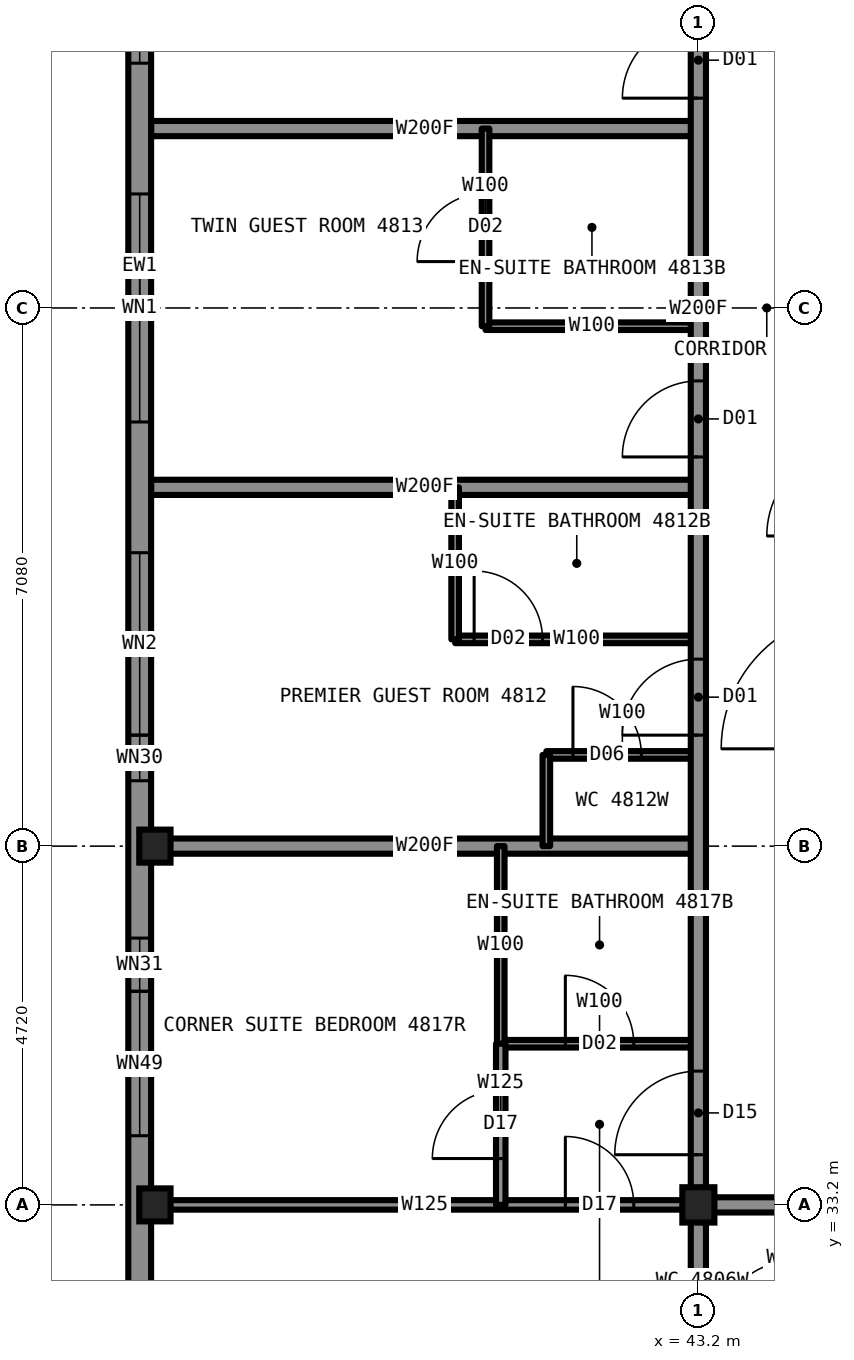
"""IFC4 building model, lengths in metres.
Left out: names, types, materials, properties, quantities, classifications, styles, units other than length and angle.
Written with IfcOpenShell. Run it as: python <this file> out.ifc"""

import sys

from ifc_helpers import new_model, si_unit, direction, frame, frame_2d, origin, origin_2d, place, context, subcontext, project, spatial, rectangle, i_section, extrude, element, fill, save


model = new_model("IFC4")
c1 = context("Model", 3, precision=1e-05, world=origin(), true_north=direction((0.0, 1.0)))
c2 = subcontext(c1, "Body", "Model", "MODEL_VIEW")
j1 = project(units=[si_unit("LENGTHUNIT", "METRE"), si_unit("PLANEANGLEUNIT", "RADIAN")], contexts=[c1])
p1 = place(None, origin())
s1 = spatial("IfcSite", under=j1, at=p1, CompositionType="ELEMENT")
p2 = place(p1, origin())
s2 = spatial("IfcBuilding", under=s1, at=p2, CompositionType="ELEMENT")
p3 = place(p2, frame((0.0, 0.0, 172.3)))
s3 = spatial("IfcBuildingStorey", under=s2, at=p3, CompositionType="ELEMENT", Elevation=172.3)
for number, where, z_axis, x_axis in (
    (1, (36.05, 33.2, 0.0), (0.0, 0.0, 1.0), (1.0, 0.0, 0.0)),
    (2, (36.05, 37.92, 0.0), (0.0, 0.0, 1.0), (1.0, 0.0, 0.0)),
):
    element("IfcColumn", number, at=place(p3, frame(where, z_axis=z_axis, x_axis=x_axis)), inside=s3, PredefinedType="COLUMN", context=c2, shape_type="SweptSolid", body=[
        extrude(i_section(OverallWidth=0.411, OverallDepth=0.434, WebThickness=0.036, FlangeThickness=0.057, at=origin_2d()), origin(), (0.0, 0.0, 1.0), 3.5),
    ])
p4 = place(p3, frame((43.2, 33.2, 0.0), z_axis=(0.0, 0.0, 1.0), x_axis=(1.0, 0.0, 0.0)))
e3 = element("IfcColumn", 3, at=p4, inside=s3, PredefinedType="COLUMN", context=c2, shape_type="SweptSolid", body=[
    extrude(i_section(OverallWidth=0.422, OverallDepth=0.465, WebThickness=0.045, FlangeThickness=0.073, at=origin_2d()), origin(), (0.0, 0.0, 1.0), 3.5),
])
p5 = place(p3, frame((40.4, 44.76, 0.0), z_axis=(0.0, 0.0, 1.0), x_axis=(1.0, 0.0, 0.0)))
e4 = element("IfcWall", 4, at=p5, inside=s3, PredefinedType="PARTITIONING", context=c2, shape_type="SweptSolid", body=[
    extrude(rectangle(XDim=2.8, YDim=0.1, at=frame_2d((1.4, 0.0))), origin(), (0.0, 0.0, 1.0), 3.33),
])
p6 = place(p3, frame((43.2, 33.2, 0.0), z_axis=(0.0, 0.0, 1.0), x_axis=(1.0, 0.0, 0.0)))
e5 = element("IfcWall", 5, at=p6, inside=s3, PredefinedType="PARTITIONING", context=c2, shape_type="SweptSolid", body=[
    extrude(rectangle(XDim=23.6, YDim=0.2, at=frame_2d((11.8, 0.0))), origin(), (0.0, 0.0, 1.0), 3.33),
])
p7 = place(p6, frame((1.46, 0.0, 0.0)))
e6 = element("IfcOpeningElement", 6, at=p7, cuts=e5, PredefinedType="OPENING", context=c2, shape_type="SweptSolid", body=[
    extrude(rectangle(XDim=1.0, YDim=2.2, at=frame_2d((0.5, 1.1))), frame((0.0, 0.11, 0.0), z_axis=(0.0, -1.0, 0.0), x_axis=(1.0, 0.0, 0.0)), (0.0, 0.0, 1.0), 0.22),
])
p8 = place(p6, frame((7.72, 0.0, 0.0)))
e7 = element("IfcOpeningElement", 7, at=p8, cuts=e5, PredefinedType="OPENING", context=c2, shape_type="SweptSolid", body=[
    extrude(rectangle(XDim=1.0, YDim=2.2, at=frame_2d((0.5, 1.1))), frame((0.0, 0.11, 0.0), z_axis=(0.0, -1.0, 0.0), x_axis=(1.0, 0.0, 0.0)), (0.0, 0.0, 1.0), 0.22),
])
p9 = place(p6, frame((17.16, 0.0, 0.0)))
e8 = element("IfcOpeningElement", 8, at=p9, cuts=e5, PredefinedType="OPENING", context=c2, shape_type="SweptSolid", body=[
    extrude(rectangle(XDim=1.0, YDim=2.2, at=frame_2d((0.5, 1.1))), frame((0.0, 0.11, 0.0), z_axis=(0.0, -1.0, 0.0), x_axis=(1.0, 0.0, 0.0)), (0.0, 0.0, 1.0), 0.22),
])
p10 = place(p3, frame((36.0, 33.2, 0.0), z_axis=(0.0, 0.0, 1.0), x_axis=(1.0, 0.0, 0.0)))
e9 = element("IfcWall", 9, at=p10, inside=s3, PredefinedType="PARTITIONING", context=c2, shape_type="SweptSolid", body=[
    extrude(rectangle(XDim=7.2, YDim=0.125, at=frame_2d((3.6, 0.0))), origin(), (0.0, 0.0, 1.0), 2.573),
])
p11 = place(p10, frame((5.45, 0.0, 0.0)))
e10 = element("IfcOpeningElement", 10, at=p11, cuts=e9, PredefinedType="OPENING", context=c2, shape_type="SweptSolid", body=[
    extrude(rectangle(XDim=0.9, YDim=2.2, at=frame_2d((0.45, 1.1))), frame((0.0, 0.073, 0.0), z_axis=(0.0, -1.0, 0.0), x_axis=(1.0, 0.0, 0.0)), (0.0, 0.0, 1.0), 0.145),
])
p12 = place(p3, frame((36.0, 42.64, 0.0), z_axis=(0.0, 0.0, 1.0), x_axis=(1.0, 0.0, 0.0)))
e11 = element("IfcWall", 11, at=p12, inside=s3, PredefinedType="PARTITIONING", context=c2, shape_type="SweptSolid", body=[
    extrude(rectangle(XDim=7.2, YDim=0.2, at=frame_2d((3.6, 0.0))), origin(), (0.0, 0.0, 1.0), 2.73),
])
p13 = place(p3, frame((40.0, 40.64, 0.0), z_axis=(0.0, 0.0, 1.0), x_axis=(1.0, 0.0, 0.0)))
e12 = element("IfcWall", 12, at=p13, inside=s3, PredefinedType="PARTITIONING", context=c2, shape_type="SweptSolid", body=[
    extrude(rectangle(XDim=3.2, YDim=0.1, at=frame_2d((1.6, 0.0))), origin(), (0.0, 0.0, 1.0), 3.33),
])
p14 = place(p13, frame((0.25, 0.0, 0.0)))
e13 = element("IfcOpeningElement", 13, at=p14, cuts=e12, PredefinedType="OPENING", context=c2, shape_type="SweptSolid", body=[
    extrude(rectangle(XDim=0.9, YDim=2.1, at=frame_2d((0.45, 1.05))), frame((0.0, 0.06, 0.0), z_axis=(0.0, -1.0, 0.0), x_axis=(1.0, 0.0, 0.0)), (0.0, 0.0, 1.0), 0.12),
])
p15 = place(p3, frame((41.2, 39.12, 0.0), z_axis=(0.0, 0.0, 1.0), x_axis=(1.0, 0.0, 0.0)))
e14 = element("IfcWall", 14, at=p15, inside=s3, PredefinedType="PARTITIONING", context=c2, shape_type="SweptSolid", body=[
    extrude(rectangle(XDim=2.0, YDim=0.1, at=frame_2d((1.0, 0.0))), origin(), (0.0, 0.0, 1.0), 3.33),
])
p16 = place(p15, frame((0.35, 0.0, 0.0)))
e15 = element("IfcOpeningElement", 15, at=p16, cuts=e14, PredefinedType="OPENING", context=c2, shape_type="SweptSolid", body=[
    extrude(rectangle(XDim=0.9, YDim=2.1, at=frame_2d((0.45, 1.05))), frame((0.0, 0.06, 0.0), z_axis=(0.0, -1.0, 0.0), x_axis=(1.0, 0.0, 0.0)), (0.0, 0.0, 1.0), 0.12),
])
p17 = place(p3, frame((36.0, 37.92, 0.0), z_axis=(0.0, 0.0, 1.0), x_axis=(1.0, 0.0, 0.0)))
e16 = element("IfcWall", 16, at=p17, inside=s3, PredefinedType="PARTITIONING", context=c2, shape_type="SweptSolid", body=[
    extrude(rectangle(XDim=7.2, YDim=0.2, at=frame_2d((3.6, 0.0))), origin(), (0.0, 0.0, 1.0), 2.573),
])
p18 = place(p3, frame((40.6, 35.32, 0.0), z_axis=(0.0, 0.0, 1.0), x_axis=(1.0, 0.0, 0.0)))
e17 = element("IfcWall", 17, at=p18, inside=s3, PredefinedType="PARTITIONING", context=c2, shape_type="SweptSolid", body=[
    extrude(rectangle(XDim=2.6, YDim=0.1, at=frame_2d((1.3, 0.0))), origin(), (0.0, 0.0, 1.0), 3.33),
])
p19 = place(p18, frame((0.85, 0.0, 0.0)))
e18 = element("IfcOpeningElement", 18, at=p19, cuts=e17, PredefinedType="OPENING", context=c2, shape_type="SweptSolid", body=[
    extrude(rectangle(XDim=0.9, YDim=2.1, at=frame_2d((0.45, 1.05))), frame((0.0, 0.06, 0.0), z_axis=(0.0, -1.0, 0.0), x_axis=(1.0, 0.0, 0.0)), (0.0, 0.0, 1.0), 0.12),
])
p20 = place(p3, frame((36.0, 47.36, 0.0), z_axis=(0.0, 0.0, 1.0), x_axis=(1.0, 0.0, 0.0)))
e19 = element("IfcWall", 19, at=p20, inside=s3, PredefinedType="PARTITIONING", context=c2, shape_type="SweptSolid", body=[
    extrude(rectangle(XDim=7.2, YDim=0.2, at=frame_2d((3.6, 0.0))), origin(), (0.0, 0.0, 1.0), 2.73),
])
p21 = place(p3, frame((43.2, 33.2, 0.0), z_axis=(0.0, 0.0, 1.0), x_axis=(0.0, 1.0, 0.0)))
e20 = element("IfcWall", 20, at=p21, inside=s3, PredefinedType="PARTITIONING", context=c2, shape_type="SweptSolid", body=[
    extrude(rectangle(XDim=23.58, YDim=0.2, at=frame_2d((11.79, 0.0))), origin(), (0.0, 0.0, 1.0), 3.33),
])
p22 = place(p21, frame((6.18, 0.0, 0.0)))
e21 = element("IfcOpeningElement", 21, at=p22, cuts=e20, PredefinedType="OPENING", context=c2, shape_type="SweptSolid", body=[
    extrude(rectangle(XDim=1.0, YDim=2.2, at=frame_2d((0.5, 1.1))), frame((0.0, 0.11, 0.0), z_axis=(0.0, -1.0, 0.0), x_axis=(1.0, 0.0, 0.0)), (0.0, 0.0, 1.0), 0.22),
])
p23 = place(p21, frame((9.84, 0.0, 0.0)))
e22 = element("IfcOpeningElement", 22, at=p23, cuts=e20, PredefinedType="OPENING", context=c2, shape_type="SweptSolid", body=[
    extrude(rectangle(XDim=1.0, YDim=2.2, at=frame_2d((0.5, 1.1))), frame((0.0, 0.11, 0.0), z_axis=(0.0, -1.0, 0.0), x_axis=(1.0, 0.0, 0.0)), (0.0, 0.0, 1.0), 0.22),
])
p24 = place(p21, frame((14.56, 0.0, 0.0)))
e23 = element("IfcOpeningElement", 23, at=p24, cuts=e20, PredefinedType="OPENING", context=c2, shape_type="SweptSolid", body=[
    extrude(rectangle(XDim=1.0, YDim=2.2, at=frame_2d((0.5, 1.1))), frame((0.0, 0.11, 0.0), z_axis=(0.0, -1.0, 0.0), x_axis=(1.0, 0.0, 0.0)), (0.0, 0.0, 1.0), 0.22),
])
p25 = place(p21, frame((22.05, 0.0, 0.0)))
e24 = element("IfcOpeningElement", 24, at=p25, cuts=e20, PredefinedType="OPENING", context=c2, shape_type="SweptSolid", body=[
    extrude(rectangle(XDim=1.1, YDim=2.2, at=frame_2d((0.55, 1.1))), frame((0.0, 0.11, 0.0), z_axis=(0.0, -1.0, 0.0), x_axis=(1.0, 0.0, 0.0)), (0.0, 0.0, 1.0), 0.22),
])
p26 = place(p21, frame((0.66, 0.0, 0.0)))
e25 = element("IfcOpeningElement", 25, at=p26, cuts=e20, PredefinedType="OPENING", context=c2, shape_type="SweptSolid", body=[
    extrude(rectangle(XDim=1.1, YDim=2.2, at=frame_2d((0.55, 1.1))), frame((0.0, 0.11, 0.0), z_axis=(0.0, -1.0, 0.0), x_axis=(1.0, 0.0, 0.0)), (0.0, 0.0, 1.0), 0.22),
])
p27 = place(p3, frame((43.2, 26.0, 0.0), z_axis=(0.0, 0.0, 1.0), x_axis=(0.0, 1.0, 0.0)))
e26 = element("IfcWall", 26, at=p27, inside=s3, PredefinedType="PARTITIONING", context=c2, shape_type="SweptSolid", body=[
    extrude(rectangle(XDim=7.2, YDim=0.2, at=frame_2d((3.6, 0.0))), origin(), (0.0, 0.0, 1.0), 2.573),
])
p28 = place(p3, frame((41.2, 37.92, 0.0), z_axis=(0.0, 0.0, 1.0), x_axis=(0.0, 1.0, 0.0)))
e27 = element("IfcWall", 27, at=p28, inside=s3, PredefinedType="PARTITIONING", context=c2, shape_type="SweptSolid", body=[
    extrude(rectangle(XDim=1.2, YDim=0.1, at=frame_2d((0.6, 0.0))), origin(), (0.0, 0.0, 1.0), 3.33),
])
p29 = place(p3, frame((40.6, 35.32, 0.0), z_axis=(0.0, 0.0, 1.0), x_axis=(0.0, 1.0, 0.0)))
e28 = element("IfcWall", 28, at=p29, inside=s3, PredefinedType="PARTITIONING", context=c2, shape_type="SweptSolid", body=[
    extrude(rectangle(XDim=2.6, YDim=0.1, at=frame_2d((1.3, 0.0))), origin(), (0.0, 0.0, 1.0), 3.33),
])
p30 = place(p3, frame((40.6, 33.2, 0.0), z_axis=(0.0, 0.0, 1.0), x_axis=(0.0, 1.0, 0.0)))
e29 = element("IfcWall", 29, at=p30, inside=s3, PredefinedType="PARTITIONING", context=c2, shape_type="SweptSolid", body=[
    extrude(rectangle(XDim=2.12, YDim=0.125, at=frame_2d((1.06, 0.0))), origin(), (0.0, 0.0, 1.0), 3.33),
])
p31 = place(p30, frame((0.61, 0.0, 0.0)))
e30 = element("IfcOpeningElement", 30, at=p31, cuts=e29, PredefinedType="OPENING", context=c2, shape_type="SweptSolid", body=[
    extrude(rectangle(XDim=0.9, YDim=2.2, at=frame_2d((0.45, 1.1))), frame((0.0, 0.073, 0.0), z_axis=(0.0, -1.0, 0.0), x_axis=(1.0, 0.0, 0.0)), (0.0, 0.0, 1.0), 0.145),
])
p32 = place(p3, frame((40.4, 44.76, 0.0), z_axis=(0.0, 0.0, 1.0), x_axis=(0.0, 1.0, 0.0)))
e31 = element("IfcWall", 31, at=p32, inside=s3, PredefinedType="PARTITIONING", context=c2, shape_type="SweptSolid", body=[
    extrude(rectangle(XDim=2.6, YDim=0.1, at=frame_2d((1.3, 0.0))), origin(), (0.0, 0.0, 1.0), 3.33),
])
p33 = place(p32, frame((0.85, 0.0, 0.0)))
e32 = element("IfcOpeningElement", 32, at=p33, cuts=e31, PredefinedType="OPENING", context=c2, shape_type="SweptSolid", body=[
    extrude(rectangle(XDim=0.9, YDim=2.1, at=frame_2d((0.45, 1.05))), frame((0.0, 0.06, 0.0), z_axis=(0.0, -1.0, 0.0), x_axis=(1.0, 0.0, 0.0)), (0.0, 0.0, 1.0), 0.12),
])
p34 = place(p3, frame((40.0, 40.64, 0.0), z_axis=(0.0, 0.0, 1.0), x_axis=(0.0, 1.0, 0.0)))
e33 = element("IfcWall", 33, at=p34, inside=s3, PredefinedType="PARTITIONING", context=c2, shape_type="SweptSolid", body=[
    extrude(rectangle(XDim=2.0, YDim=0.1, at=frame_2d((1.0, 0.0))), origin(), (0.0, 0.0, 1.0), 3.33),
])
p35 = place(p3, frame((35.85, 58.8, 0.0), z_axis=(0.0, 0.0, 1.0), x_axis=(0.0, -1.0, 0.0)))
e34 = element("IfcWall", 34, at=p35, inside=s3, PredefinedType="SOLIDWALL", context=c2, shape_type="SweptSolid", body=[
    extrude(rectangle(XDim=27.6, YDim=0.3, at=frame_2d((13.8, 0.0))), origin(), (0.0, 0.0, 1.0), 2.83),
])
p36 = place(p35, frame((3.46, 0.0, 0.3)))
e35 = element("IfcOpeningElement", 35, at=p36, cuts=e34, PredefinedType="OPENING", context=c2, shape_type="SweptSolid", body=[
    extrude(rectangle(XDim=2.4, YDim=2.0, at=frame_2d((1.2, 1.0))), frame((0.0, 0.16, 0.0), z_axis=(0.0, -1.0, 0.0), x_axis=(1.0, 0.0, 0.0)), (0.0, 0.0, 1.0), 0.32),
])
p37 = place(p35, frame((7.58, 0.0, 0.3)))
e36 = element("IfcOpeningElement", 36, at=p37, cuts=e34, PredefinedType="OPENING", context=c2, shape_type="SweptSolid", body=[
    extrude(rectangle(XDim=3.0, YDim=2.0, at=frame_2d((1.5, 1.0))), frame((0.0, 0.16, 0.0), z_axis=(0.0, -1.0, 0.0), x_axis=(1.0, 0.0, 0.0)), (0.0, 0.0, 1.0), 0.32),
])
p38 = place(p35, frame((12.3, 0.0, 0.3)))
e37 = element("IfcOpeningElement", 37, at=p38, cuts=e34, PredefinedType="OPENING", context=c2, shape_type="SweptSolid", body=[
    extrude(rectangle(XDim=3.0, YDim=2.0, at=frame_2d((1.5, 1.0))), frame((0.0, 0.16, 0.0), z_axis=(0.0, -1.0, 0.0), x_axis=(1.0, 0.0, 0.0)), (0.0, 0.0, 1.0), 0.32),
])
p39 = place(p35, frame((17.02, 0.0, 0.3)))
e38 = element("IfcOpeningElement", 38, at=p39, cuts=e34, PredefinedType="OPENING", context=c2, shape_type="SweptSolid", body=[
    extrude(rectangle(XDim=3.0, YDim=2.0, at=frame_2d((1.5, 1.0))), frame((0.0, 0.16, 0.0), z_axis=(0.0, -1.0, 0.0), x_axis=(1.0, 0.0, 0.0)), (0.0, 0.0, 1.0), 0.32),
])
p40 = place(p35, frame((21.74, 0.0, 0.3)))
e39 = element("IfcOpeningElement", 39, at=p40, cuts=e34, PredefinedType="OPENING", context=c2, shape_type="SweptSolid", body=[
    extrude(rectangle(XDim=2.4, YDim=2.0, at=frame_2d((1.2, 1.0))), frame((0.0, 0.16, 0.0), z_axis=(0.0, -1.0, 0.0), x_axis=(1.0, 0.0, 0.0)), (0.0, 0.0, 1.0), 0.32),
])
p41 = place(p35, frame((2.86, 0.0, 0.3)))
e40 = element("IfcOpeningElement", 40, at=p41, cuts=e34, PredefinedType="OPENING", context=c2, shape_type="SweptSolid", body=[
    extrude(rectangle(XDim=0.6, YDim=1.1, at=frame_2d((0.3, 0.55))), frame((0.0, 0.16, 0.0), z_axis=(0.0, -1.0, 0.0), x_axis=(1.0, 0.0, 0.0)), (0.0, 0.0, 1.0), 0.32),
])
p42 = place(p35, frame((24.14, 0.0, 0.3)))
e41 = element("IfcOpeningElement", 41, at=p42, cuts=e34, PredefinedType="OPENING", context=c2, shape_type="SweptSolid", body=[
    extrude(rectangle(XDim=0.6, YDim=1.1, at=frame_2d((0.3, 0.55))), frame((0.0, 0.16, 0.0), z_axis=(0.0, -1.0, 0.0), x_axis=(1.0, 0.0, 0.0)), (0.0, 0.0, 1.0), 0.32),
])
p43 = place(p22, origin())
e42 = element("IfcDoor", 42, at=p43, inside=s3, OperationType="SINGLE_SWING_LEFT", PredefinedType="DOOR", context=c2, shape_type="SweptSolid", body=[
    extrude(rectangle(XDim=1.0, YDim=2.2, at=frame_2d((0.5, 1.1))), frame((0.0, 0.025, 0.0), z_axis=(0.0, -1.0, 0.0), x_axis=(1.0, 0.0, 0.0)), (0.0, 0.0, 1.0), 0.05),
])
fill(e21, e42)
p44 = place(p14, origin())
e43 = element("IfcDoor", 43, at=p44, inside=s3, OperationType="SINGLE_SWING_RIGHT", PredefinedType="DOOR", context=c2, shape_type="SweptSolid", body=[
    extrude(rectangle(XDim=0.9, YDim=2.1, at=frame_2d((0.45, 1.05))), frame((0.0, 0.025, 0.0), z_axis=(0.0, -1.0, 0.0), x_axis=(1.0, 0.0, 0.0)), (0.0, 0.0, 1.0), 0.05),
])
fill(e13, e43)
p45 = place(p16, origin())
e44 = element("IfcDoor", 44, at=p45, inside=s3, OperationType="SINGLE_SWING_LEFT", PredefinedType="DOOR", context=c2, shape_type="SweptSolid", body=[
    extrude(rectangle(XDim=0.9, YDim=2.1, at=frame_2d((0.45, 1.05))), frame((0.0, 0.025, 0.0), z_axis=(0.0, -1.0, 0.0), x_axis=(1.0, 0.0, 0.0)), (0.0, 0.0, 1.0), 0.05),
])
fill(e15, e44)
p46 = place(p23, origin())
e45 = element("IfcDoor", 45, at=p46, inside=s3, OperationType="SINGLE_SWING_LEFT", PredefinedType="DOOR", context=c2, shape_type="SweptSolid", body=[
    extrude(rectangle(XDim=1.0, YDim=2.2, at=frame_2d((0.5, 1.1))), frame((0.0, 0.025, 0.0), z_axis=(0.0, -1.0, 0.0), x_axis=(1.0, 0.0, 0.0)), (0.0, 0.0, 1.0), 0.05),
])
fill(e22, e45)
p47 = place(p33, origin())
e46 = element("IfcDoor", 46, at=p47, inside=s3, OperationType="SINGLE_SWING_RIGHT", PredefinedType="DOOR", context=c2, shape_type="SweptSolid", body=[
    extrude(rectangle(XDim=0.9, YDim=2.1, at=frame_2d((0.45, 1.05))), frame((0.0, 0.025, 0.0), z_axis=(0.0, -1.0, 0.0), x_axis=(1.0, 0.0, 0.0)), (0.0, 0.0, 1.0), 0.05),
])
fill(e32, e46)
p48 = place(p24, origin())
e47 = element("IfcDoor", 47, at=p48, inside=s3, OperationType="SINGLE_SWING_LEFT", PredefinedType="DOOR", context=c2, shape_type="SweptSolid", body=[
    extrude(rectangle(XDim=1.0, YDim=2.2, at=frame_2d((0.5, 1.1))), frame((0.0, 0.025, 0.0), z_axis=(0.0, -1.0, 0.0), x_axis=(1.0, 0.0, 0.0)), (0.0, 0.0, 1.0), 0.05),
])
fill(e23, e47)
p49 = place(p11, origin())
e48 = element("IfcDoor", 48, at=p49, inside=s3, OperationType="SINGLE_SWING_LEFT", PredefinedType="DOOR", context=c2, shape_type="SweptSolid", body=[
    extrude(rectangle(XDim=0.9, YDim=2.2, at=frame_2d((0.45, 1.1))), frame((0.0, 0.025, 0.0), z_axis=(0.0, -1.0, 0.0), x_axis=(1.0, 0.0, 0.0)), (0.0, 0.0, 1.0), 0.05),
])
fill(e10, e48)
p50 = place(p19, origin())
e49 = element("IfcDoor", 49, at=p50, inside=s3, OperationType="SINGLE_SWING_RIGHT", PredefinedType="DOOR", context=c2, shape_type="SweptSolid", body=[
    extrude(rectangle(XDim=0.9, YDim=2.1, at=frame_2d((0.45, 1.05))), frame((0.0, 0.025, 0.0), z_axis=(0.0, -1.0, 0.0), x_axis=(1.0, 0.0, 0.0)), (0.0, 0.0, 1.0), 0.05),
])
fill(e18, e49)
p51 = place(p26, origin())
e50 = element("IfcDoor", 50, at=p51, inside=s3, OperationType="SINGLE_SWING_LEFT", PredefinedType="DOOR", context=c2, shape_type="SweptSolid", body=[
    extrude(rectangle(XDim=1.1, YDim=2.2, at=frame_2d((0.55, 1.1))), frame((0.0, 0.025, 0.0), z_axis=(0.0, -1.0, 0.0), x_axis=(1.0, 0.0, 0.0)), (0.0, 0.0, 1.0), 0.05),
])
fill(e25, e50)
p52 = place(p31, origin())
e51 = element("IfcDoor", 51, at=p52, inside=s3, OperationType="SINGLE_SWING_LEFT", PredefinedType="DOOR", context=c2, shape_type="SweptSolid", body=[
    extrude(rectangle(XDim=0.9, YDim=2.2, at=frame_2d((0.45, 1.1))), frame((0.0, 0.025, 0.0), z_axis=(0.0, -1.0, 0.0), x_axis=(1.0, 0.0, 0.0)), (0.0, 0.0, 1.0), 0.05),
])
fill(e30, e51)
p53 = place(p37, origin())
e52 = element("IfcWindow", 52, at=p53, inside=s3, PartitioningType="SINGLE_PANEL", PredefinedType="WINDOW", context=c2, shape_type="SweptSolid", body=[
    extrude(rectangle(XDim=3.0, YDim=2.0, at=frame_2d((1.5, 1.0))), frame((0.0, 0.13, 0.0), z_axis=(0.0, -1.0, 0.0), x_axis=(1.0, 0.0, 0.0)), (0.0, 0.0, 1.0), 0.06),
])
fill(e36, e52)
p54 = place(p38, origin())
e53 = element("IfcWindow", 53, at=p54, inside=s3, PartitioningType="SINGLE_PANEL", PredefinedType="WINDOW", context=c2, shape_type="SweptSolid", body=[
    extrude(rectangle(XDim=3.0, YDim=2.0, at=frame_2d((1.5, 1.0))), frame((0.0, 0.13, 0.0), z_axis=(0.0, -1.0, 0.0), x_axis=(1.0, 0.0, 0.0)), (0.0, 0.0, 1.0), 0.06),
])
fill(e37, e53)
p55 = place(p39, origin())
e54 = element("IfcWindow", 54, at=p55, inside=s3, PartitioningType="SINGLE_PANEL", PredefinedType="WINDOW", context=c2, shape_type="SweptSolid", body=[
    extrude(rectangle(XDim=3.0, YDim=2.0, at=frame_2d((1.5, 1.0))), frame((0.0, 0.13, 0.0), z_axis=(0.0, -1.0, 0.0), x_axis=(1.0, 0.0, 0.0)), (0.0, 0.0, 1.0), 0.06),
])
fill(e38, e54)
p56 = place(p40, origin())
e55 = element("IfcWindow", 55, at=p56, inside=s3, PartitioningType="SINGLE_PANEL", PredefinedType="WINDOW", context=c2, shape_type="SweptSolid", body=[
    extrude(rectangle(XDim=2.4, YDim=2.0, at=frame_2d((1.2, 1.0))), frame((0.0, 0.13, 0.0), z_axis=(0.0, -1.0, 0.0), x_axis=(1.0, 0.0, 0.0)), (0.0, 0.0, 1.0), 0.06),
])
fill(e39, e55)
p57 = place(p42, origin())
e56 = element("IfcWindow", 56, at=p57, inside=s3, PartitioningType="SINGLE_PANEL", PredefinedType="WINDOW", context=c2, shape_type="SweptSolid", body=[
    extrude(rectangle(XDim=0.6, YDim=1.1, at=frame_2d((0.3, 0.55))), frame((0.0, 0.13, 0.0), z_axis=(0.0, -1.0, 0.0), x_axis=(1.0, 0.0, 0.0)), (0.0, 0.0, 1.0), 0.06),
])
fill(e41, e56)
save(model, sys.argv[1])
